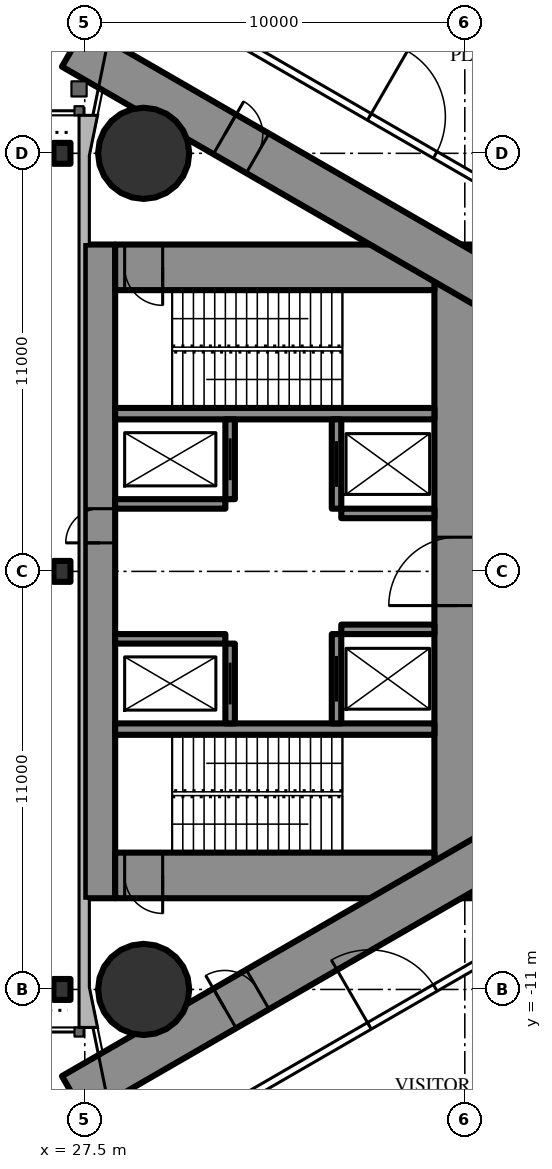
"""IFC4 building model, lengths in metres.
Left out: names, types, materials, properties, quantities, classifications, styles, units other than length and angle.
Written with IfcOpenShell. Run it as: python <this file> out.ifc"""

import sys

from ifc_helpers import new_model, si_unit, direction, frame, frame_2d, origin, origin_2d, place, context, subcontext, project, spatial, rectangle, circle, i_section, extrude, element, fill, save


model = new_model("IFC4")
c1 = context("Model", 3, precision=1e-05, world=origin(), true_north=direction((0.0, 1.0)))
c2 = subcontext(c1, "Body", "Model", "MODEL_VIEW")
j1 = project(units=[si_unit("LENGTHUNIT", "METRE"), si_unit("PLANEANGLEUNIT", "RADIAN")], contexts=[c1])
p1 = place(None, origin())
s1 = spatial("IfcSite", under=j1, at=p1, CompositionType="ELEMENT")
p2 = place(p1, origin())
s2 = spatial("IfcBuilding", under=s1, at=p2, CompositionType="ELEMENT")
p3 = place(p2, frame((0.0, 0.0, 257.3)))
s3 = spatial("IfcBuildingStorey", under=s2, at=p3, CompositionType="ELEMENT", Elevation=257.3)
for number, where, z_axis, x_axis in (
    (1, (29.05, 11.0, 0.0), (0.0, 0.0, 1.0), (1.0, 0.0, 0.0)),
    (2, (29.05, -11.0, 0.0), (0.0, 0.0, 1.0), (1.0, 0.0, 0.0)),
):
    element("IfcColumn", number, at=place(p3, frame(where, z_axis=z_axis, x_axis=x_axis)), inside=s3, PredefinedType="COLUMN", context=c2, shape_type="SweptSolid", body=[
        extrude(circle(Radius=1.2, at=origin_2d()), origin(), (0.0, 0.0, 1.0), 6.0),
    ])
p4 = place(p3, frame((27.9, -8.6, 0.0), z_axis=(0.0, 0.0, 1.0), x_axis=(0.0, 1.0, 0.0)))
e3 = element("IfcWall", 3, at=p4, inside=s3, PredefinedType="SHEAR", context=c2, shape_type="SweptSolid", body=[
    extrude(rectangle(XDim=17.2, YDim=0.8, at=frame_2d((8.6, 0.0))), origin(), (0.0, 0.0, 1.0), 6.0),
])
p5 = place(p4, frame((9.35, 0.0, 0.0)))
e4 = element("IfcOpeningElement", 4, at=p5, cuts=e3, PredefinedType="OPENING", context=c2, shape_type="SweptSolid", body=[
    extrude(rectangle(XDim=0.9, YDim=2.2, at=frame_2d((0.45, 1.1))), frame((0.0, 0.41, 0.0), z_axis=(0.0, -1.0, 0.0), x_axis=(1.0, 0.0, 0.0)), (0.0, 0.0, 1.0), 0.82),
])
p6 = place(p3, frame((37.3, -8.6, 0.0), z_axis=(0.0, 0.0, 1.0), x_axis=(0.0, 1.0, 0.0)))
e5 = element("IfcWall", 5, at=p6, inside=s3, PredefinedType="SHEAR", context=c2, shape_type="SweptSolid", body=[
    extrude(rectangle(XDim=17.2, YDim=1.2, at=frame_2d((8.6, 0.0))), origin(), (0.0, 0.0, 1.0), 6.0),
])
p7 = place(p6, frame((7.7, 0.0, 0.0)))
e6 = element("IfcOpeningElement", 6, at=p7, cuts=e5, PredefinedType="OPENING", context=c2, shape_type="SweptSolid", body=[
    extrude(rectangle(XDim=1.8, YDim=2.2, at=frame_2d((0.9, 1.1))), frame((0.0, 0.61, 0.0), z_axis=(0.0, -1.0, 0.0), x_axis=(1.0, 0.0, 0.0)), (0.0, 0.0, 1.0), 1.22),
])
p8 = place(p3, frame((28.3, -8.0, 0.0), z_axis=(0.0, 0.0, 1.0), x_axis=(1.0, 0.0, 0.0)))
e7 = element("IfcWall", 7, at=p8, inside=s3, PredefinedType="SHEAR", context=c2, shape_type="SweptSolid", body=[
    extrude(rectangle(XDim=8.4, YDim=1.2, at=frame_2d((4.2, 0.0))), origin(), (0.0, 0.0, 1.0), 6.0),
])
p9 = place(p8, frame((0.25, 0.0, 0.0)))
e8 = element("IfcOpeningElement", 8, at=p9, cuts=e7, PredefinedType="OPENING", context=c2, shape_type="SweptSolid", body=[
    extrude(rectangle(XDim=1.0, YDim=2.2, at=frame_2d((0.5, 1.1))), frame((0.0, 0.61, 0.0), z_axis=(0.0, -1.0, 0.0), x_axis=(1.0, 0.0, 0.0)), (0.0, 0.0, 1.0), 1.22),
])
p10 = place(p3, frame((28.3, 8.0, 0.0), z_axis=(0.0, 0.0, 1.0), x_axis=(1.0, 0.0, 0.0)))
e9 = element("IfcWall", 9, at=p10, inside=s3, PredefinedType="SHEAR", context=c2, shape_type="SweptSolid", body=[
    extrude(rectangle(XDim=8.4, YDim=1.2, at=frame_2d((4.2, 0.0))), origin(), (0.0, 0.0, 1.0), 6.0),
])
p11 = place(p10, frame((0.25, 0.0, 0.0)))
e10 = element("IfcOpeningElement", 10, at=p11, cuts=e9, PredefinedType="OPENING", context=c2, shape_type="SweptSolid", body=[
    extrude(rectangle(XDim=1.0, YDim=2.2, at=frame_2d((0.5, 1.1))), frame((0.0, 0.61, 0.0), z_axis=(0.0, -1.0, 0.0), x_axis=(1.0, 0.0, 0.0)), (0.0, 0.0, 1.0), 1.22),
])
for number, where, z_axis, x_axis in (
    (11, (28.3, -4.15, 0.0), (0.0, 0.0, 1.0), (1.0, 0.0, 0.0)),
    (12, (28.3, 4.15, 0.0), (0.0, 0.0, 1.0), (1.0, 0.0, 0.0)),
):
    element("IfcWall", number, at=place(p3, frame(where, z_axis=z_axis, x_axis=x_axis)), inside=s3, PredefinedType="SHEAR", context=c2, shape_type="SweptSolid", body=[
        extrude(rectangle(XDim=8.4, YDim=0.3, at=frame_2d((4.2, 0.0))), origin(), (0.0, 0.0, 1.0), 6.0),
    ])
p12 = place(p3, frame((31.325, -4.0, 0.0), z_axis=(0.0, 0.0, 1.0), x_axis=(0.0, 1.0, 0.0)))
e13 = element("IfcWall", 13, at=p12, inside=s3, PredefinedType="SHEAR", context=c2, shape_type="SweptSolid", body=[
    extrude(rectangle(XDim=2.1, YDim=0.25, at=frame_2d((1.05, 0.0))), origin(), (0.0, 0.0, 1.0), 6.0),
])
p13 = place(p12, frame((0.5, 0.0, 0.0)))
e14 = element("IfcOpeningElement", 14, at=p13, cuts=e13, PredefinedType="OPENING", context=c2, shape_type="SweptSolid", body=[
    extrude(rectangle(XDim=1.1, YDim=2.2, at=frame_2d((0.55, 1.1))), frame((0.0, 0.135, 0.0), z_axis=(0.0, -1.0, 0.0), x_axis=(1.0, 0.0, 0.0)), (0.0, 0.0, 1.0), 0.27),
])
p14 = place(p3, frame((34.125, -4.0, 0.0), z_axis=(0.0, 0.0, 1.0), x_axis=(0.0, 1.0, 0.0)))
e15 = element("IfcWall", 15, at=p14, inside=s3, PredefinedType="SHEAR", context=c2, shape_type="SweptSolid", body=[
    extrude(rectangle(XDim=2.35, YDim=0.25, at=frame_2d((1.175, 0.0))), origin(), (0.0, 0.0, 1.0), 6.0),
])
p15 = place(p14, frame((0.575, 0.0, 0.0)))
e16 = element("IfcOpeningElement", 16, at=p15, cuts=e15, PredefinedType="OPENING", context=c2, shape_type="SweptSolid", body=[
    extrude(rectangle(XDim=1.2, YDim=2.2, at=frame_2d((0.6, 1.1))), frame((0.0, 0.135, 0.0), z_axis=(0.0, -1.0, 0.0), x_axis=(1.0, 0.0, 0.0)), (0.0, 0.0, 1.0), 0.27),
])
p16 = place(p3, frame((28.3, -1.775, 0.0), z_axis=(0.0, 0.0, 1.0), x_axis=(1.0, 0.0, 0.0)))
e17 = element("IfcWall", 17, at=p16, inside=s3, PredefinedType="SHEAR", context=c2, shape_type="SweptSolid", body=[
    extrude(rectangle(XDim=2.9, YDim=0.25, at=frame_2d((1.45, 0.0))), origin(), (0.0, 0.0, 1.0), 6.0),
])
p17 = place(p3, frame((34.25, -1.525, 0.0), z_axis=(0.0, 0.0, 1.0), x_axis=(1.0, 0.0, 0.0)))
e18 = element("IfcWall", 18, at=p17, inside=s3, PredefinedType="SHEAR", context=c2, shape_type="SweptSolid", body=[
    extrude(rectangle(XDim=2.45, YDim=0.25, at=frame_2d((1.225, 0.0))), origin(), (0.0, 0.0, 1.0), 6.0),
])
p18 = place(p3, frame((31.325, 1.9, 0.0), z_axis=(0.0, 0.0, 1.0), x_axis=(0.0, 1.0, 0.0)))
e19 = element("IfcWall", 19, at=p18, inside=s3, PredefinedType="SHEAR", context=c2, shape_type="SweptSolid", body=[
    extrude(rectangle(XDim=2.1, YDim=0.25, at=frame_2d((1.05, 0.0))), origin(), (0.0, 0.0, 1.0), 6.0),
])
p19 = place(p18, frame((0.5, 0.0, 0.0)))
e20 = element("IfcOpeningElement", 20, at=p19, cuts=e19, PredefinedType="OPENING", context=c2, shape_type="SweptSolid", body=[
    extrude(rectangle(XDim=1.1, YDim=2.2, at=frame_2d((0.55, 1.1))), frame((0.0, 0.135, 0.0), z_axis=(0.0, -1.0, 0.0), x_axis=(1.0, 0.0, 0.0)), (0.0, 0.0, 1.0), 0.27),
])
p20 = place(p3, frame((34.125, 1.65, 0.0), z_axis=(0.0, 0.0, 1.0), x_axis=(0.0, 1.0, 0.0)))
e21 = element("IfcWall", 21, at=p20, inside=s3, PredefinedType="SHEAR", context=c2, shape_type="SweptSolid", body=[
    extrude(rectangle(XDim=2.35, YDim=0.25, at=frame_2d((1.175, 0.0))), origin(), (0.0, 0.0, 1.0), 6.0),
])
p21 = place(p20, frame((0.575, 0.0, 0.0)))
e22 = element("IfcOpeningElement", 22, at=p21, cuts=e21, PredefinedType="OPENING", context=c2, shape_type="SweptSolid", body=[
    extrude(rectangle(XDim=1.2, YDim=2.2, at=frame_2d((0.6, 1.1))), frame((0.0, 0.135, 0.0), z_axis=(0.0, -1.0, 0.0), x_axis=(1.0, 0.0, 0.0)), (0.0, 0.0, 1.0), 0.27),
])
p22 = place(p3, frame((28.3, 1.775, 0.0), z_axis=(0.0, 0.0, 1.0), x_axis=(1.0, 0.0, 0.0)))
e23 = element("IfcWall", 23, at=p22, inside=s3, PredefinedType="SHEAR", context=c2, shape_type="SweptSolid", body=[
    extrude(rectangle(XDim=2.9, YDim=0.25, at=frame_2d((1.45, 0.0))), origin(), (0.0, 0.0, 1.0), 6.0),
])
p23 = place(p3, frame((34.25, 1.525, 0.0), z_axis=(0.0, 0.0, 1.0), x_axis=(1.0, 0.0, 0.0)))
e24 = element("IfcWall", 24, at=p23, inside=s3, PredefinedType="SHEAR", context=c2, shape_type="SweptSolid", body=[
    extrude(rectangle(XDim=2.45, YDim=0.25, at=frame_2d((1.225, 0.0))), origin(), (0.0, 0.0, 1.0), 6.0),
])
p24 = place(p3, frame((27.2, -13.8, 0.0), z_axis=(0.0, 0.0, 1.0), x_axis=(0.866027159892, 0.499996958321, 0.0)))
e25 = element("IfcWall", 25, at=p24, inside=s3, PredefinedType="SHEAR", context=c2, shape_type="SweptSolid", body=[
    extrude(rectangle(XDim=27.947, YDim=1.2, at=frame_2d((13.973, 0.0))), origin(), (0.0, 0.0, 1.0), 6.0),
])
p25 = place(p24, frame((4.6, 0.0, 0.0)))
e26 = element("IfcOpeningElement", 26, at=p25, cuts=e25, PredefinedType="OPENING", context=c2, shape_type="SweptSolid", body=[
    extrude(rectangle(XDim=1.0, YDim=2.2, at=frame_2d((0.5, 1.1))), frame((0.0, 0.61, 0.0), z_axis=(0.0, -1.0, 0.0), x_axis=(1.0, 0.0, 0.0)), (0.0, 0.0, 1.0), 1.22),
])
p26 = place(p24, frame((13.395, 0.0, 0.0)))
e27 = element("IfcOpeningElement", 27, at=p26, cuts=e25, PredefinedType="OPENING", context=c2, shape_type="SweptSolid", body=[
    extrude(rectangle(XDim=1.8, YDim=2.2, at=frame_2d((0.9, 1.1))), frame((0.0, 0.61, 0.0), z_axis=(0.0, -1.0, 0.0), x_axis=(1.0, 0.0, 0.0)), (0.0, 0.0, 1.0), 1.22),
])
p27 = place(p3, frame((27.2, 13.8, 0.0), z_axis=(0.0, 0.0, 1.0), x_axis=(0.866024515034, -0.500001539357, 0.0)))
e28 = element("IfcWall", 28, at=p27, inside=s3, PredefinedType="SHEAR", context=c2, shape_type="SweptSolid", body=[
    extrude(rectangle(XDim=26.907, YDim=1.2, at=frame_2d((13.454, 0.0))), origin(), (0.0, 0.0, 1.0), 6.0),
])
p28 = place(p27, frame((4.6, 0.0, 0.0)))
e29 = element("IfcOpeningElement", 29, at=p28, cuts=e28, PredefinedType="OPENING", context=c2, shape_type="SweptSolid", body=[
    extrude(rectangle(XDim=1.0, YDim=2.2, at=frame_2d((0.5, 1.1))), frame((0.0, 0.61, 0.0), z_axis=(0.0, -1.0, 0.0), x_axis=(1.0, 0.0, 0.0)), (0.0, 0.0, 1.0), 1.22),
])
p29 = place(p27, frame((13.395, 0.0, 0.0)))
e30 = element("IfcOpeningElement", 30, at=p29, cuts=e28, PredefinedType="OPENING", context=c2, shape_type="SweptSolid", body=[
    extrude(rectangle(XDim=1.8, YDim=2.2, at=frame_2d((0.9, 1.1))), frame((0.0, 0.61, 0.0), z_axis=(0.0, -1.0, 0.0), x_axis=(1.0, 0.0, 0.0)), (0.0, 0.0, 1.0), 1.22),
])
for number, where, z_axis, x_axis in (
    (31, (26.9, -11.0, 0.0), (0.0, 0.0, 1.0), (1.0, 0.0, 0.0)),
    (32, (26.9, 0.0, 0.0), (0.0, 0.0, 1.0), (1.0, 0.0, 0.0)),
    (33, (26.9, 11.0, 0.0), (0.0, 0.0, 1.0), (1.0, 0.0, 0.0)),
):
    element("IfcColumn", number, at=place(p3, frame(where, z_axis=z_axis, x_axis=x_axis)), inside=s3, PredefinedType="COLUMN", context=c2, shape_type="SweptSolid", body=[
        extrude(i_section(OverallWidth=0.448, OverallDepth=0.55, WebThickness=0.072, FlangeThickness=0.115, FilletRadius=0.02, at=origin_2d()), origin(), (0.0, 0.0, 1.0), 6.0),
    ])
p30 = place(p3, frame((28.907, -15.47, 0.0), z_axis=(0.0, 0.0, 1.0), x_axis=(0.866023700353, 0.500002950419, 0.0)))
e34 = element("IfcWall", 34, at=p30, inside=s3, PredefinedType="PARTITIONING", context=c2, shape_type="SweptSolid", body=[
    extrude(rectangle(XDim=30.941, YDim=0.2, at=frame_2d((15.47, 0.0))), origin(), (0.0, 0.0, 1.0), 5.75),
])
p31 = place(p30, frame((7.024, 0.0, 0.0)))
e35 = element("IfcOpeningElement", 35, at=p31, cuts=e34, PredefinedType="OPENING", context=c2, shape_type="SweptSolid", body=[
    extrude(rectangle(XDim=2.0, YDim=2.4, at=frame_2d((1.0, 1.2))), frame((0.0, 0.11, 0.0), z_axis=(0.0, -1.0, 0.0), x_axis=(1.0, 0.0, 0.0)), (0.0, 0.0, 1.0), 0.22),
])
p32 = place(p30, frame((16.865, 0.0, 0.0)))
e36 = element("IfcOpeningElement", 36, at=p32, cuts=e34, PredefinedType="OPENING", context=c2, shape_type="SweptSolid", body=[
    extrude(rectangle(XDim=1.8, YDim=2.2, at=frame_2d((0.9, 1.1))), frame((0.0, 0.11, 0.0), z_axis=(0.0, -1.0, 0.0), x_axis=(1.0, 0.0, 0.0)), (0.0, 0.0, 1.0), 0.22),
])
p33 = place(p30, frame((20.748, 0.0, 0.0)))
e37 = element("IfcOpeningElement", 37, at=p33, cuts=e34, PredefinedType="OPENING", context=c2, shape_type="SweptSolid", body=[
    extrude(rectangle(XDim=1.8, YDim=2.2, at=frame_2d((0.9, 1.1))), frame((0.0, 0.11, 0.0), z_axis=(0.0, -1.0, 0.0), x_axis=(1.0, 0.0, 0.0)), (0.0, 0.0, 1.0), 0.22),
])
p34 = place(p30, frame((26.152, 0.0, 0.0)))
e38 = element("IfcOpeningElement", 38, at=p34, cuts=e34, PredefinedType="OPENING", context=c2, shape_type="SweptSolid", body=[
    extrude(rectangle(XDim=2.0, YDim=2.4, at=frame_2d((1.0, 1.2))), frame((0.0, 0.11, 0.0), z_axis=(0.0, -1.0, 0.0), x_axis=(1.0, 0.0, 0.0)), (0.0, 0.0, 1.0), 0.22),
])
p35 = place(p3, frame((28.907, 15.47, 0.0), z_axis=(0.0, 0.0, 1.0), x_axis=(0.866025841386, -0.499999242051, 0.0)))
e39 = element("IfcWall", 39, at=p35, inside=s3, PredefinedType="PARTITIONING", context=c2, shape_type="SweptSolid", body=[
    extrude(rectangle(XDim=30.821, YDim=0.2, at=frame_2d((15.41, 0.0))), origin(), (0.0, 0.0, 1.0), 5.75),
])
p36 = place(p35, frame((26.092, 0.0, 0.0)))
e40 = element("IfcOpeningElement", 40, at=p36, cuts=e39, PredefinedType="OPENING", context=c2, shape_type="SweptSolid", body=[
    extrude(rectangle(XDim=2.0, YDim=2.4, at=frame_2d((1.0, 1.2))), frame((0.0, 0.11, 0.0), z_axis=(0.0, -1.0, 0.0), x_axis=(1.0, 0.0, 0.0)), (0.0, 0.0, 1.0), 0.22),
])
p37 = place(p35, frame((20.748, 0.0, 0.0)))
e41 = element("IfcOpeningElement", 41, at=p37, cuts=e39, PredefinedType="OPENING", context=c2, shape_type="SweptSolid", body=[
    extrude(rectangle(XDim=1.8, YDim=2.2, at=frame_2d((0.9, 1.1))), frame((0.0, 0.11, 0.0), z_axis=(0.0, -1.0, 0.0), x_axis=(1.0, 0.0, 0.0)), (0.0, 0.0, 1.0), 0.22),
])
p38 = place(p35, frame((16.865, 0.0, 0.0)))
e42 = element("IfcOpeningElement", 42, at=p38, cuts=e39, PredefinedType="OPENING", context=c2, shape_type="SweptSolid", body=[
    extrude(rectangle(XDim=1.8, YDim=2.2, at=frame_2d((0.9, 1.1))), frame((0.0, 0.11, 0.0), z_axis=(0.0, -1.0, 0.0), x_axis=(1.0, 0.0, 0.0)), (0.0, 0.0, 1.0), 0.22),
])
p39 = place(p35, frame((7.024, 0.0, 0.0)))
e43 = element("IfcOpeningElement", 43, at=p39, cuts=e39, PredefinedType="OPENING", context=c2, shape_type="SweptSolid", body=[
    extrude(rectangle(XDim=2.0, YDim=2.4, at=frame_2d((1.0, 1.2))), frame((0.0, 0.11, 0.0), z_axis=(0.0, -1.0, 0.0), x_axis=(1.0, 0.0, 0.0)), (0.0, 0.0, 1.0), 0.22),
])
p40 = place(p31, origin())
e44 = element("IfcDoor", 44, at=p40, inside=s3, OperationType="DOUBLE_DOOR_SINGLE_SWING", PredefinedType="DOOR", context=c2, shape_type="SweptSolid", body=[
    extrude(rectangle(XDim=2.0, YDim=2.4, at=frame_2d((1.0, 1.2))), frame((0.0, 0.025, 0.0), z_axis=(0.0, -1.0, 0.0), x_axis=(1.0, 0.0, 0.0)), (0.0, 0.0, 1.0), 0.05),
])
fill(e35, e44)
p41 = place(p39, origin())
e45 = element("IfcDoor", 45, at=p41, inside=s3, OperationType="DOUBLE_DOOR_SINGLE_SWING", PredefinedType="DOOR", context=c2, shape_type="SweptSolid", body=[
    extrude(rectangle(XDim=2.0, YDim=2.4, at=frame_2d((1.0, 1.2))), frame((0.0, 0.025, 0.0), z_axis=(0.0, -1.0, 0.0), x_axis=(1.0, 0.0, 0.0)), (0.0, 0.0, 1.0), 0.05),
])
fill(e43, e45)
p42 = place(p25, origin())
e46 = element("IfcDoor", 46, at=p42, inside=s3, OperationType="SINGLE_SWING_LEFT", PredefinedType="DOOR", context=c2, shape_type="SweptSolid", body=[
    extrude(rectangle(XDim=1.0, YDim=2.2, at=frame_2d((0.5, 1.1))), frame((0.0, 0.025, 0.0), z_axis=(0.0, -1.0, 0.0), x_axis=(1.0, 0.0, 0.0)), (0.0, 0.0, 1.0), 0.05),
])
fill(e26, e46)
p43 = place(p28, origin())
e47 = element("IfcDoor", 47, at=p43, inside=s3, OperationType="SINGLE_SWING_LEFT", PredefinedType="DOOR", context=c2, shape_type="SweptSolid", body=[
    extrude(rectangle(XDim=1.0, YDim=2.2, at=frame_2d((0.5, 1.1))), frame((0.0, 0.025, 0.0), z_axis=(0.0, -1.0, 0.0), x_axis=(1.0, 0.0, 0.0)), (0.0, 0.0, 1.0), 0.05),
])
fill(e29, e47)
p44 = place(p7, origin())
e48 = element("IfcDoor", 48, at=p44, inside=s3, OperationType="DOUBLE_DOOR_SINGLE_SWING", PredefinedType="DOOR", context=c2, shape_type="SweptSolid", body=[
    extrude(rectangle(XDim=1.8, YDim=2.2, at=frame_2d((0.9, 1.1))), frame((0.0, 0.025, 0.0), z_axis=(0.0, -1.0, 0.0), x_axis=(1.0, 0.0, 0.0)), (0.0, 0.0, 1.0), 0.05),
])
fill(e6, e48)
p45 = place(p9, origin())
e49 = element("IfcDoor", 49, at=p45, inside=s3, OperationType="SINGLE_SWING_RIGHT", PredefinedType="DOOR", context=c2, shape_type="SweptSolid", body=[
    extrude(rectangle(XDim=1.0, YDim=2.2, at=frame_2d((0.5, 1.1))), frame((0.0, 0.025, 0.0), z_axis=(0.0, -1.0, 0.0), x_axis=(1.0, 0.0, 0.0)), (0.0, 0.0, 1.0), 0.05),
])
fill(e8, e49)
p46 = place(p11, origin())
e50 = element("IfcDoor", 50, at=p46, inside=s3, OperationType="SINGLE_SWING_RIGHT", PredefinedType="DOOR", context=c2, shape_type="SweptSolid", body=[
    extrude(rectangle(XDim=1.0, YDim=2.2, at=frame_2d((0.5, 1.1))), frame((0.0, 0.025, 0.0), z_axis=(0.0, -1.0, 0.0), x_axis=(1.0, 0.0, 0.0)), (0.0, 0.0, 1.0), 0.05),
])
fill(e10, e50)
p47 = place(p5, origin())
e51 = element("IfcDoor", 51, at=p47, inside=s3, OperationType="SINGLE_SWING_LEFT", PredefinedType="DOOR", context=c2, shape_type="SweptSolid", body=[
    extrude(rectangle(XDim=0.9, YDim=2.2, at=frame_2d((0.45, 1.1))), frame((0.0, 0.025, 0.0), z_axis=(0.0, -1.0, 0.0), x_axis=(1.0, 0.0, 0.0)), (0.0, 0.0, 1.0), 0.05),
])
fill(e4, e51)
p48 = place(p13, origin())
e52 = element("IfcDoor", 52, at=p48, inside=s3, OperationType="SLIDING_TO_LEFT", PredefinedType="USERDEFINED", context=c2, shape_type="SweptSolid", body=[
    extrude(rectangle(XDim=1.1, YDim=2.2, at=frame_2d((0.55, 1.1))), frame((0.0, 0.025, 0.0), z_axis=(0.0, -1.0, 0.0), x_axis=(1.0, 0.0, 0.0)), (0.0, 0.0, 1.0), 0.05),
])
fill(e14, e52)
p49 = place(p19, origin())
e53 = element("IfcDoor", 53, at=p49, inside=s3, OperationType="SLIDING_TO_LEFT", PredefinedType="USERDEFINED", context=c2, shape_type="SweptSolid", body=[
    extrude(rectangle(XDim=1.1, YDim=2.2, at=frame_2d((0.55, 1.1))), frame((0.0, 0.025, 0.0), z_axis=(0.0, -1.0, 0.0), x_axis=(1.0, 0.0, 0.0)), (0.0, 0.0, 1.0), 0.05),
])
fill(e20, e53)
p50 = place(p15, origin())
e54 = element("IfcDoor", 54, at=p50, inside=s3, OperationType="DOUBLE_DOOR_SLIDING", PredefinedType="USERDEFINED", context=c2, shape_type="SweptSolid", body=[
    extrude(rectangle(XDim=1.2, YDim=2.2, at=frame_2d((0.6, 1.1))), frame((0.0, 0.025, 0.0), z_axis=(0.0, -1.0, 0.0), x_axis=(1.0, 0.0, 0.0)), (0.0, 0.0, 1.0), 0.05),
])
fill(e16, e54)
p51 = place(p21, origin())
e55 = element("IfcDoor", 55, at=p51, inside=s3, OperationType="DOUBLE_DOOR_SLIDING", PredefinedType="USERDEFINED", context=c2, shape_type="SweptSolid", body=[
    extrude(rectangle(XDim=1.2, YDim=2.2, at=frame_2d((0.6, 1.1))), frame((0.0, 0.025, 0.0), z_axis=(0.0, -1.0, 0.0), x_axis=(1.0, 0.0, 0.0)), (0.0, 0.0, 1.0), 0.05),
])
fill(e22, e55)
save(model, sys.argv[1])
